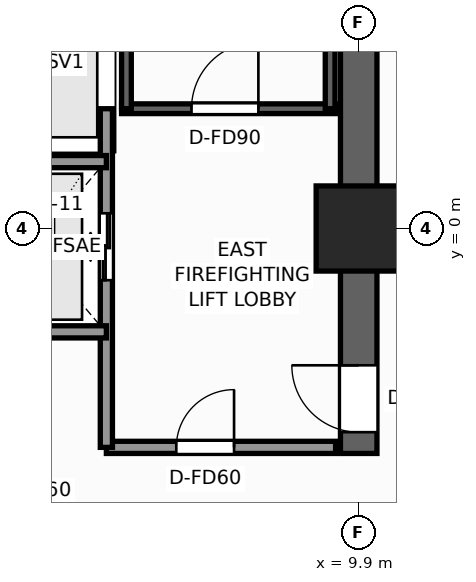
"""IFC4 building model, lengths in metres.
Left out: names, types, materials, properties, quantities, classifications, styles, units other than length and angle.
Written with IfcOpenShell. Run it as: python <this file> out.ifc"""

import sys

from ifc_helpers import new_model, si_unit, direction, frame, frame_2d, origin, origin_2d, place, context, subcontext, project, spatial, rectangle, extrude, element, fill, save


model = new_model("IFC4")
c1 = context("Model", 3, precision=1e-05, world=origin(), true_north=direction((0.0, 1.0)))
c2 = subcontext(c1, "Body", "Model", "MODEL_VIEW")
j1 = project(units=[si_unit("LENGTHUNIT", "METRE"), si_unit("PLANEANGLEUNIT", "RADIAN")], contexts=[c1])
p1 = place(None, origin())
s1 = spatial("IfcSite", under=j1, at=p1, CompositionType="ELEMENT")
p2 = place(p1, origin())
s2 = spatial("IfcBuilding", under=s1, at=p2, CompositionType="ELEMENT")
p3 = place(p2, frame((0.0, 0.0, 78.8)))
s3 = spatial("IfcBuildingStorey", under=s2, at=p3, CompositionType="ELEMENT", Elevation=78.8)
p4 = place(p3, frame((9.9, -3.7, 0.0), z_axis=(0.0, 0.0, 1.0), x_axis=(0.0, 1.0, 0.0)))
e1 = element("IfcWall", 1, at=p4, inside=s3, PredefinedType="SHEAR", context=c2, shape_type="SweptSolid", body=[
    extrude(rectangle(XDim=13.3, YDim=0.6, at=frame_2d((6.65, 0.0))), origin(), (0.0, 0.0, 1.0), 3.3),
])
p5 = place(p4, frame((0.35, 0.0, 0.0)))
e2 = element("IfcOpeningElement", 2, at=p5, cuts=e1, PredefinedType="OPENING", context=c2, shape_type="SweptSolid", body=[
    extrude(rectangle(XDim=1.1, YDim=2.2, at=frame_2d((0.55, 1.1))), frame((0.0, 0.31, 0.0), z_axis=(0.0, -1.0, 0.0), x_axis=(1.0, 0.0, 0.0)), (0.0, 0.0, 1.0), 0.62),
])
p6 = place(p3, frame((9.9, 0.0, 0.0), z_axis=(0.0, 0.0, 1.0), x_axis=(1.0, 0.0, 0.0)))
e3 = element("IfcColumn", 3, at=p6, inside=s3, PredefinedType="COLUMN", context=c2, shape_type="SweptSolid", body=[
    extrude(rectangle(XDim=1.4, YDim=1.4, at=origin_2d()), origin(), (0.0, 0.0, 1.0), 3.3),
])
p7 = place(p3, frame((6.0, 1.97, 0.0), z_axis=(0.0, 0.0, 1.0), x_axis=(1.0, 0.0, 0.0)))
e4 = element("IfcWall", 4, at=p7, inside=s3, PredefinedType="SHEAR", context=c2, shape_type="SweptSolid", body=[
    extrude(rectangle(XDim=3.52, YDim=0.16, at=frame_2d((1.76, 0.0))), origin(), (0.0, 0.0, 1.0), 3.3),
])
p8 = place(p7, frame((1.15, 0.0, 0.0)))
e5 = element("IfcOpeningElement", 5, at=p8, cuts=e4, PredefinedType="OPENING", context=c2, shape_type="SweptSolid", body=[
    extrude(rectangle(XDim=1.1, YDim=2.2, at=frame_2d((0.55, 1.1))), frame((0.0, 0.09, 0.0), z_axis=(0.0, -1.0, 0.0), x_axis=(1.0, 0.0, 0.0)), (0.0, 0.0, 1.0), 0.18),
])
for number, where, z_axis, x_axis in (
    (6, (6.08, 1.97, 0.0), (0.0, 0.0, 1.0), (0.0, 1.0, 0.0)),
    (7, (9.43, 1.97, 0.0), (0.0, 0.0, 1.0), (0.0, 1.0, 0.0)),
):
    element("IfcWall", number, at=place(p3, frame(where, z_axis=z_axis, x_axis=x_axis)), inside=s3, PredefinedType="SHEAR", context=c2, shape_type="SweptSolid", body=[
        extrude(rectangle(XDim=7.56, YDim=0.16, at=frame_2d((3.78, 0.0))), origin(), (0.0, 0.0, 1.0), 3.3),
    ])
p9 = place(p3, frame((5.75, -3.6, 0.0), z_axis=(0.0, 0.0, 1.0), x_axis=(1.0, 0.0, 0.0)))
e8 = element("IfcWall", 8, at=p9, inside=s3, PredefinedType="SOLIDWALL", context=c2, shape_type="SweptSolid", body=[
    extrude(rectangle(XDim=3.77, YDim=0.2, at=frame_2d((1.885, 0.0))), origin(), (0.0, 0.0, 1.0), 3.08),
])
p10 = place(p9, frame((1.15, 0.0, 0.0)))
e9 = element("IfcOpeningElement", 9, at=p10, cuts=e8, PredefinedType="OPENING", context=c2, shape_type="SweptSolid", body=[
    extrude(rectangle(XDim=0.95, YDim=2.06, at=frame_2d((0.475, 1.03))), frame((0.0, 0.11, 0.0), z_axis=(0.0, -1.0, 0.0), x_axis=(1.0, 0.0, 0.0)), (0.0, 0.0, 1.0), 0.22),
])
p11 = place(p3, frame((5.75, -3.6, 0.0), z_axis=(0.0, 0.0, 1.0), x_axis=(0.0, 1.0, 0.0)))
e10 = element("IfcWall", 10, at=p11, inside=s3, PredefinedType="SOLIDWALL", context=c2, shape_type="SweptSolid", body=[
    extrude(rectangle(XDim=5.57, YDim=0.2, at=frame_2d((2.785, 0.0))), origin(), (0.0, 0.0, 1.0), 3.08),
])
p12 = place(p11, frame((2.75, 0.0, 0.0)))
e11 = element("IfcOpeningElement", 11, at=p12, cuts=e10, PredefinedType="OPENING", context=c2, shape_type="SweptSolid", body=[
    extrude(rectangle(XDim=1.1, YDim=2.2, at=frame_2d((0.55, 1.1))), frame((0.0, 0.11, 0.0), z_axis=(0.0, -1.0, 0.0), x_axis=(1.0, 0.0, 0.0)), (0.0, 0.0, 1.0), 0.22),
])
for number, where, z_axis, x_axis in (
    (12, (3.35, -1.7, 0.0), (0.0, 0.0, 1.0), (1.0, 0.0, 0.0)),
    (13, (3.35, 1.1, 0.0), (0.0, 0.0, 1.0), (1.0, 0.0, 0.0)),
):
    element("IfcWall", number, at=place(p3, frame(where, z_axis=z_axis, x_axis=x_axis)), inside=s3, PredefinedType="SOLIDWALL", context=c2, shape_type="SweptSolid", body=[
        extrude(rectangle(XDim=2.4, YDim=0.2, at=frame_2d((1.2, 0.0))), origin(), (0.0, 0.0, 1.0), 3.08),
    ])
p13 = place(p8, origin())
e14 = element("IfcDoor", 14, at=p13, inside=s3, OperationType="SINGLE_SWING_RIGHT", PredefinedType="DOOR", context=c2, shape_type="SweptSolid", body=[
    extrude(rectangle(XDim=1.1, YDim=2.2, at=frame_2d((0.55, 1.1))), frame((0.0, 0.025, 0.0), z_axis=(0.0, -1.0, 0.0), x_axis=(1.0, 0.0, 0.0)), (0.0, 0.0, 1.0), 0.05),
])
fill(e5, e14)
p14 = place(p5, origin())
e15 = element("IfcDoor", 15, at=p14, inside=s3, OperationType="SINGLE_SWING_RIGHT", PredefinedType="DOOR", context=c2, shape_type="SweptSolid", body=[
    extrude(rectangle(XDim=1.1, YDim=2.2, at=frame_2d((0.55, 1.1))), frame((0.0, 0.025, 0.0), z_axis=(0.0, -1.0, 0.0), x_axis=(1.0, 0.0, 0.0)), (0.0, 0.0, 1.0), 0.05),
])
fill(e2, e15)
p15 = place(p12, origin())
e16 = element("IfcDoor", 16, at=p15, inside=s3, OperationType="DOUBLE_DOOR_SLIDING", PredefinedType="DOOR", context=c2, shape_type="SweptSolid", body=[
    extrude(rectangle(XDim=1.1, YDim=2.2, at=frame_2d((0.55, 1.1))), frame((0.0, 0.025, 0.0), z_axis=(0.0, -1.0, 0.0), x_axis=(1.0, 0.0, 0.0)), (0.0, 0.0, 1.0), 0.05),
])
fill(e11, e16)
p16 = place(p10, origin())
e17 = element("IfcDoor", 17, at=p16, inside=s3, OperationType="SINGLE_SWING_RIGHT", PredefinedType="DOOR", context=c2, shape_type="SweptSolid", body=[
    extrude(rectangle(XDim=0.95, YDim=2.06, at=frame_2d((0.475, 1.03))), frame((0.0, 0.025, 0.0), z_axis=(0.0, -1.0, 0.0), x_axis=(1.0, 0.0, 0.0)), (0.0, 0.0, 1.0), 0.05),
])
fill(e9, e17)
save(model, sys.argv[1])
